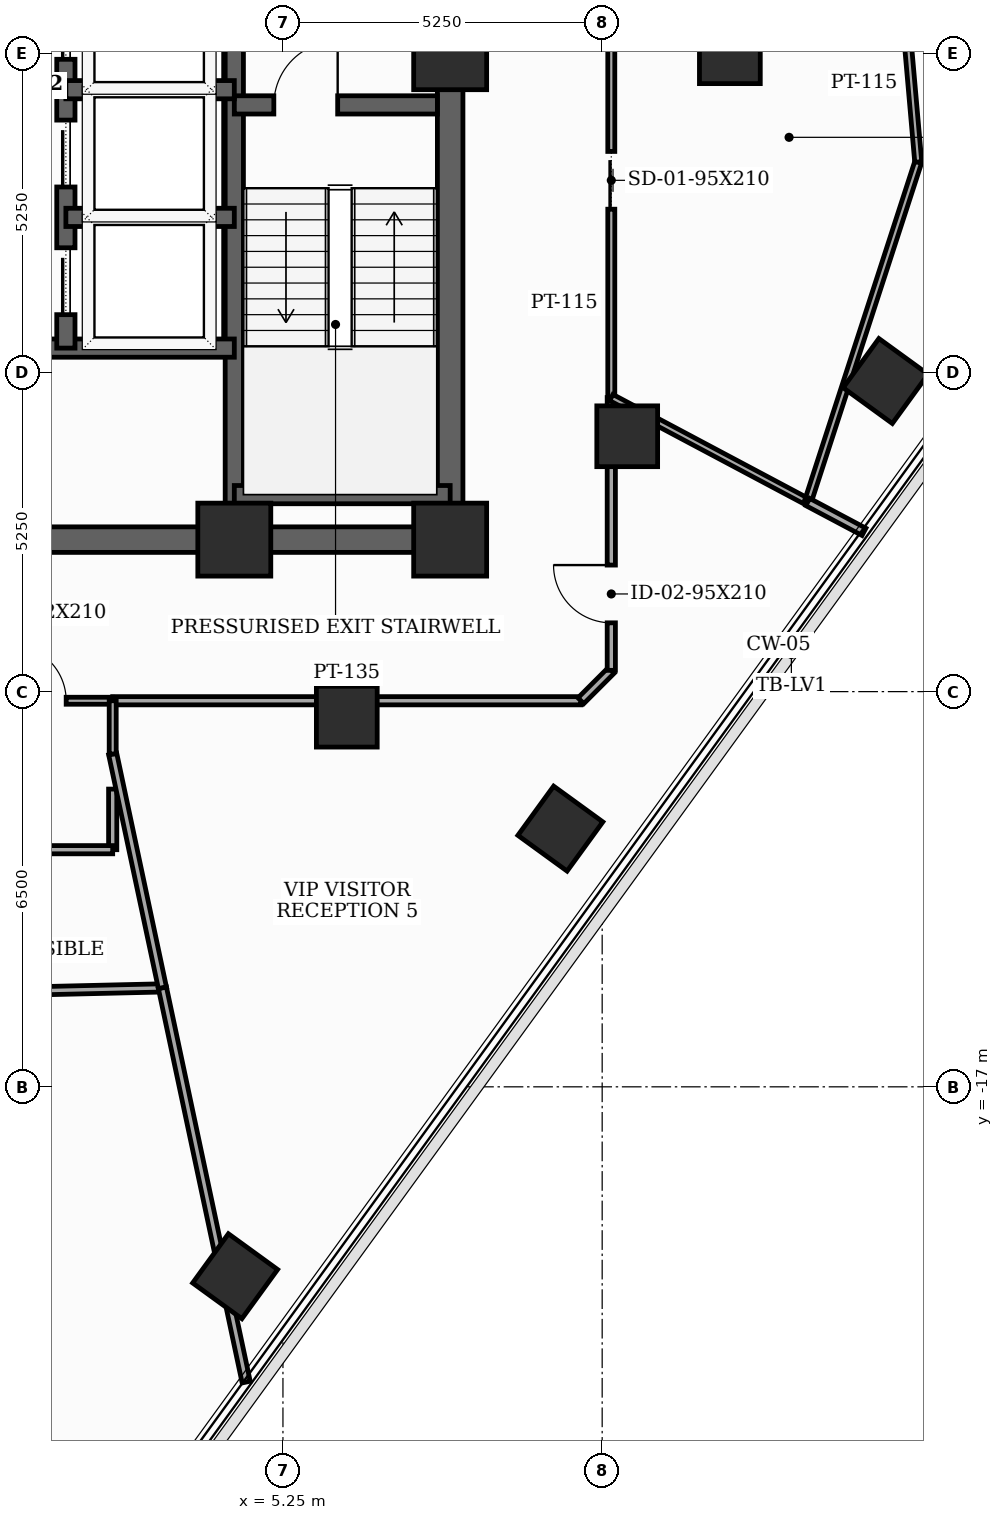
"""IFC4 building model, lengths in metres.
Left out: names, types, materials, properties, quantities, classifications, styles, units other than length and angle.
Written with IfcOpenShell. Run it as: python <this file> out.ifc"""

import sys

from ifc_helpers import new_model, si_unit, direction, frame, frame_2d, origin, origin_2d, place, context, subcontext, project, spatial, rectangle, extrude, element, fill, save


model = new_model("IFC4")
c1 = context("Model", 3, precision=1e-05, world=origin(), true_north=direction((0.0, 1.0)))
c2 = subcontext(c1, "Body", "Model", "MODEL_VIEW")
j1 = project(units=[si_unit("LENGTHUNIT", "METRE"), si_unit("PLANEANGLEUNIT", "RADIAN")], contexts=[c1])
p1 = place(None, origin())
s1 = spatial("IfcSite", under=j1, at=p1, CompositionType="ELEMENT")
p2 = place(p1, origin())
s2 = spatial("IfcBuilding", under=s1, at=p2, CompositionType="ELEMENT")
p3 = place(p2, frame((0.0, 0.0, 218.9)))
s3 = spatial("IfcBuildingStorey", under=s2, at=p3, CompositionType="ELEMENT", Elevation=218.9)
for number, where, z_axis, x_axis in (
    (1, (4.45, -8.0, 0.0), (0.0, 0.0, 1.0), (1.0, 0.0, 0.0)),
    (2, (8.0, -8.0, 0.0), (0.0, 0.0, 1.0), (1.0, 0.0, 0.0)),
    (3, (8.0, 0.0, 0.0), (0.0, 0.0, 1.0), (1.0, 0.0, 0.0)),
):
    element("IfcColumn", number, at=place(p3, frame(where, z_axis=z_axis, x_axis=x_axis)), inside=s3, PredefinedType="COLUMN", context=c2, shape_type="SweptSolid", body=[
        extrude(rectangle(XDim=1.2, YDim=1.2, at=origin_2d()), origin(), (0.0, 0.0, 1.0), 3.7),
    ])
for number, where, z_axis, x_axis in (
    (4, (12.6, 0.0, 0.0), (0.0, 0.0, 1.0), (1.0, 0.0, 0.0)),
    (5, (6.3, -10.912, 0.0), (0.0, 0.0, 1.0), (1.0, 0.0, 0.0)),
    (6, (10.912, -6.3, 0.0), (0.0, 0.0, 1.0), (1.0, 0.0, 0.0)),
    (7, (4.464, -20.115, 0.0), (0.0, 0.0, 1.0), (0.588, 0.809, 0.0)),
    (8, (9.812, -12.753, 0.0), (0.0, 0.0, 1.0), (0.588, 0.809, 0.0)),
    (9, (15.161, -5.391, 0.0), (0.0, 0.0, 1.0), (0.588, 0.809, 0.0)),
):
    element("IfcColumn", number, at=place(p3, frame(where, z_axis=z_axis, x_axis=x_axis)), inside=s3, PredefinedType="COLUMN", context=c2, shape_type="SweptSolid", body=[
        extrude(rectangle(XDim=1.0, YDim=1.0, at=origin_2d()), origin(), (0.0, 0.0, 1.0), 3.7),
    ])
p4 = place(p3, frame((8.0, -8.0, 0.0), z_axis=(0.0, 0.0, 1.0), x_axis=(0.0, 1.0, 0.0)))
e10 = element("IfcWall", 10, at=p4, inside=s3, PredefinedType="SHEAR", context=c2, shape_type="SweptSolid", body=[
    extrude(rectangle(XDim=16.0, YDim=0.42, at=frame_2d((8.0, 0.0))), origin(), (0.0, 0.0, 1.0), 3.5),
])
p5 = place(p4, frame((9.6, 0.0, 0.0)))
e11 = element("IfcOpeningElement", 11, at=p5, cuts=e10, PredefinedType="OPENING", context=c2, shape_type="SweptSolid", body=[
    extrude(rectangle(XDim=1.05, YDim=2.15, at=frame_2d((0.525, 1.075))), frame((0.0, 0.22, 0.0), z_axis=(0.0, -1.0, 0.0), x_axis=(1.0, 0.0, 0.0)), (0.0, 0.0, 1.0), 0.44),
])
p6 = place(p4, frame((14.389, 0.0, 0.0)))
e12 = element("IfcOpeningElement", 12, at=p6, cuts=e10, PredefinedType="OPENING", context=c2, shape_type="SweptSolid", body=[
    extrude(rectangle(XDim=0.85, YDim=2.02, at=frame_2d((0.425, 1.01))), frame((0.0, 0.22, 0.0), z_axis=(0.0, -1.0, 0.0), x_axis=(1.0, 0.0, 0.0)), (0.0, 0.0, 1.0), 0.44),
])
p7 = place(p3, frame((-8.0, -8.0, 0.0), z_axis=(0.0, 0.0, 1.0), x_axis=(1.0, 0.0, 0.0)))
e13 = element("IfcWall", 13, at=p7, inside=s3, PredefinedType="SHEAR", context=c2, shape_type="SweptSolid", body=[
    extrude(rectangle(XDim=16.0, YDim=0.42, at=frame_2d((8.0, 0.0))), origin(), (0.0, 0.0, 1.0), 3.5),
])
p8 = place(p7, frame((7.52, 0.0, 0.0)))
e14 = element("IfcOpeningElement", 14, at=p8, cuts=e13, PredefinedType="OPENING", context=c2, shape_type="SweptSolid", body=[
    extrude(rectangle(XDim=0.95, YDim=2.1, at=frame_2d((0.475, 1.05))), frame((0.0, 0.22, 0.0), z_axis=(0.0, -1.0, 0.0), x_axis=(1.0, 0.0, 0.0)), (0.0, 0.0, 1.0), 0.44),
])
p9 = place(p3, frame((4.45, -7.79, 0.0), z_axis=(0.0, 0.0, 1.0), x_axis=(0.0, 1.0, 0.0)))
e15 = element("IfcWall", 15, at=p9, inside=s3, PredefinedType="SHEAR", context=c2, shape_type="SweptSolid", body=[
    extrude(rectangle(XDim=15.58, YDim=0.3, at=frame_2d((7.79, 0.0))), origin(), (0.0, 0.0, 1.0), 3.5),
])
p10 = place(p3, frame((4.45, -0.85, 0.0), z_axis=(0.0, 0.0, 1.0), x_axis=(1.0, 0.0, 0.0)))
e16 = element("IfcWall", 16, at=p10, inside=s3, PredefinedType="SHEAR", context=c2, shape_type="SweptSolid", body=[
    extrude(rectangle(XDim=3.34, YDim=0.3, at=frame_2d((1.67, 0.0))), origin(), (0.0, 0.0, 1.0), 3.5),
])
p11 = place(p10, frame((0.65, 0.0, 0.0)))
e17 = element("IfcOpeningElement", 17, at=p11, cuts=e16, PredefinedType="OPENING", context=c2, shape_type="SweptSolid", body=[
    extrude(rectangle(XDim=1.05, YDim=2.15, at=frame_2d((0.525, 1.075))), frame((0.0, 0.16, 0.0), z_axis=(0.0, -1.0, 0.0), x_axis=(1.0, 0.0, 0.0)), (0.0, 0.0, 1.0), 0.32),
])
p12 = place(p3, frame((4.45, -7.26, 0.0), z_axis=(0.0, 0.0, 1.0), x_axis=(1.0, 0.0, 0.0)))
e18 = element("IfcWall", 18, at=p12, inside=s3, PredefinedType="SHEAR", context=c2, shape_type="SweptSolid", body=[
    extrude(rectangle(XDim=3.55, YDim=0.3, at=frame_2d((1.775, 0.0))), origin(), (0.0, 0.0, 1.0), 3.5),
])
p13 = place(p3, frame((-4.45, -4.85, 0.0), z_axis=(0.0, 0.0, 1.0), x_axis=(1.0, 0.0, 0.0)))
e19 = element("IfcWall", 19, at=p13, inside=s3, PredefinedType="SHEAR", context=c2, shape_type="SweptSolid", body=[
    extrude(rectangle(XDim=8.9, YDim=0.3, at=frame_2d((4.45, 0.0))), origin(), (0.0, 0.0, 1.0), 3.5),
])
p14 = place(p3, frame((1.68, -4.85, 0.0), z_axis=(0.0, 0.0, 1.0), x_axis=(0.0, 1.0, 0.0)))
e20 = element("IfcWall", 20, at=p14, inside=s3, PredefinedType="SHEAR", context=c2, shape_type="SweptSolid", body=[
    extrude(rectangle(XDim=12.64, YDim=0.3, at=frame_2d((6.32, 0.0))), origin(), (0.0, 0.0, 1.0), 3.5),
])
p15 = place(p14, frame((0.55, 0.0, 0.0)))
e21 = element("IfcOpeningElement", 21, at=p15, cuts=e20, PredefinedType="OPENING", context=c2, shape_type="SweptSolid", body=[
    extrude(rectangle(XDim=1.1, YDim=2.1, at=frame_2d((0.55, 1.05))), frame((0.0, 0.16, 0.0), z_axis=(0.0, -1.0, 0.0), x_axis=(1.0, 0.0, 0.0)), (0.0, 0.0, 1.0), 0.32),
])
p16 = place(p14, frame((2.65, 0.0, 0.0)))
e22 = element("IfcOpeningElement", 22, at=p16, cuts=e20, PredefinedType="OPENING", context=c2, shape_type="SweptSolid", body=[
    extrude(rectangle(XDim=1.1, YDim=2.1, at=frame_2d((0.55, 1.05))), frame((0.0, 0.16, 0.0), z_axis=(0.0, -1.0, 0.0), x_axis=(1.0, 0.0, 0.0)), (0.0, 0.0, 1.0), 0.32),
])
p17 = place(p14, frame((4.75, 0.0, 0.0)))
e23 = element("IfcOpeningElement", 23, at=p17, cuts=e20, PredefinedType="OPENING", context=c2, shape_type="SweptSolid", body=[
    extrude(rectangle(XDim=1.1, YDim=2.1, at=frame_2d((0.55, 1.05))), frame((0.0, 0.16, 0.0), z_axis=(0.0, -1.0, 0.0), x_axis=(1.0, 0.0, 0.0)), (0.0, 0.0, 1.0), 0.32),
])
p18 = place(p14, frame((8.2, 0.0, 0.0)))
e24 = element("IfcOpeningElement", 24, at=p18, cuts=e20, PredefinedType="OPENING", context=c2, shape_type="SweptSolid", body=[
    extrude(rectangle(XDim=0.95, YDim=2.1, at=frame_2d((0.475, 1.05))), frame((0.0, 0.16, 0.0), z_axis=(0.0, -1.0, 0.0), x_axis=(1.0, 0.0, 0.0)), (0.0, 0.0, 1.0), 0.32),
])
p19 = place(p14, frame((11.25, 0.0, 0.0)))
e25 = element("IfcOpeningElement", 25, at=p19, cuts=e20, PredefinedType="OPENING", context=c2, shape_type="SweptSolid", body=[
    extrude(rectangle(XDim=0.95, YDim=2.1, at=frame_2d((0.475, 1.05))), frame((0.0, 0.16, 0.0), z_axis=(0.0, -1.0, 0.0), x_axis=(1.0, 0.0, 0.0)), (0.0, 0.0, 1.0), 0.32),
])
for number, where, z_axis, x_axis in (
    (26, (1.68, -2.7, 0.0), (0.0, 0.0, 1.0), (1.0, 0.0, 0.0)),
    (27, (1.68, -0.6, 0.0), (0.0, 0.0, 1.0), (1.0, 0.0, 0.0)),
):
    element("IfcWall", number, at=place(p3, frame(where, z_axis=z_axis, x_axis=x_axis)), inside=s3, PredefinedType="SHEAR", context=c2, shape_type="SweptSolid", body=[
        extrude(rectangle(XDim=2.77, YDim=0.3, at=frame_2d((1.385, 0.0))), origin(), (0.0, 0.0, 1.0), 3.5),
    ])
p20 = place(p3, frame((10.65, -5.663, 0.0), z_axis=(0.0, 0.0, 1.0), x_axis=(0.0, 1.0, 0.0)))
e28 = element("IfcWall", 28, at=p20, inside=s3, PredefinedType="PARTITIONING", context=c2, shape_type="SweptSolid", body=[
    extrude(rectangle(XDim=7.145, YDim=0.115, at=frame_2d((3.573, 0.0))), origin(), (0.0, 0.0, 1.0), 2.885),
])
p21 = place(p20, frame((3.097, 0.0, 0.0)))
e29 = element("IfcOpeningElement", 29, at=p21, cuts=e28, PredefinedType="OPENING", context=c2, shape_type="SweptSolid", body=[
    extrude(rectangle(XDim=0.95, YDim=2.1, at=frame_2d((0.475, 1.05))), frame((0.0, 0.067, 0.0), z_axis=(0.0, -1.0, 0.0), x_axis=(1.0, 0.0, 0.0)), (0.0, 0.0, 1.0), 0.135),
])
p22 = place(p3, frame((0.0, -10.65, 0.0), z_axis=(0.0, 0.0, 1.0), x_axis=(1.0, 0.0, 0.0)))
e30 = element("IfcWall", 30, at=p22, inside=s3, PredefinedType="PARTITIONING", context=c2, shape_type="SweptSolid", body=[
    extrude(rectangle(XDim=2.45, YDim=0.115, at=frame_2d((1.225, 0.0))), origin(), (0.0, 0.0, 1.0), 3.5),
])
p23 = place(p22, frame((0.765, 0.0, 0.0)))
e31 = element("IfcOpeningElement", 31, at=p23, cuts=e30, PredefinedType="OPENING", context=c2, shape_type="SweptSolid", body=[
    extrude(rectangle(XDim=0.92, YDim=2.1, at=frame_2d((0.46, 1.05))), frame((0.0, 0.067, 0.0), z_axis=(0.0, -1.0, 0.0), x_axis=(1.0, 0.0, 0.0)), (0.0, 0.0, 1.0), 0.135),
])
p24 = place(p3, frame((2.45, -10.65, 0.0), z_axis=(0.0, 0.0, 1.0), x_axis=(1.0, 0.0, 0.0)))
e32 = element("IfcWall", 32, at=p24, inside=s3, PredefinedType="PARTITIONING", context=c2, shape_type="SweptSolid", body=[
    extrude(rectangle(XDim=7.7, YDim=0.135, at=frame_2d((3.85, 0.0))), origin(), (0.0, 0.0, 1.0), 2.885),
])
p25 = place(p3, frame((10.15, -10.65, 0.0), z_axis=(0.0, 0.0, 1.0), x_axis=(0.707106781187, 0.707106781187, 0.0)))
e33 = element("IfcWall", 33, at=p25, inside=s3, PredefinedType="PARTITIONING", context=c2, shape_type="SweptSolid", body=[
    extrude(rectangle(XDim=0.707, YDim=0.135, at=frame_2d((0.354, 0.0))), origin(), (0.0, 0.0, 1.0), 3.5),
])
p26 = place(p3, frame((10.65, -10.15, 0.0), z_axis=(0.0, 0.0, 1.0), x_axis=(0.0, 1.0, 0.0)))
e34 = element("IfcWall", 34, at=p26, inside=s3, PredefinedType="PARTITIONING", context=c2, shape_type="SweptSolid", body=[
    extrude(rectangle(XDim=4.487, YDim=0.135, at=frame_2d((2.243, 0.0))), origin(), (0.0, 0.0, 1.0), 2.885),
])
p27 = place(p26, frame((0.781, 0.0, 0.0)))
e35 = element("IfcOpeningElement", 35, at=p27, cuts=e34, PredefinedType="OPENING", context=c2, shape_type="SweptSolid", body=[
    extrude(rectangle(XDim=0.95, YDim=2.1, at=frame_2d((0.475, 1.05))), frame((0.0, 0.077, 0.0), z_axis=(0.0, -1.0, 0.0), x_axis=(1.0, 0.0, 0.0)), (0.0, 0.0, 1.0), 0.155),
])
p28 = place(p3, frame((10.65, -5.663, 0.0), z_axis=(0.0, 0.0, 1.0), x_axis=(0.882952413676, -0.469462496036, 0.0)))
e36 = element("IfcWall", 36, at=p28, inside=s3, PredefinedType="PARTITIONING", context=c2, shape_type="SweptSolid", body=[
    extrude(rectangle(XDim=3.659, YDim=0.115, at=frame_2d((1.83, 0.0))), origin(), (0.0, 0.0, 1.0), 2.885),
])
p29 = place(p3, frame((13.881, -7.381, 0.0), z_axis=(0.0, 0.0, 1.0), x_axis=(0.309006266506, 0.951060001924, 0.0)))
e37 = element("IfcWall", 37, at=p29, inside=s3, PredefinedType="PARTITIONING", context=c2, shape_type="SweptSolid", body=[
    extrude(rectangle(XDim=5.88, YDim=0.115, at=frame_2d((2.94, 0.0))), origin(), (0.0, 0.0, 1.0), 2.985),
])
p30 = place(p3, frame((15.698, -1.789, 0.0), z_axis=(0.0, 0.0, 1.0), x_axis=(-0.087153009445, 0.996194937221, 0.0)))
e38 = element("IfcWall", 38, at=p30, inside=s3, PredefinedType="PARTITIONING", context=c2, shape_type="SweptSolid", body=[
    extrude(rectangle(XDim=6.3, YDim=0.115, at=frame_2d((3.15, 0.0))), origin(), (0.0, 0.0, 1.0), 2.985),
])
p31 = place(p30, frame((2.69, 0.0, 0.0)))
e39 = element("IfcOpeningElement", 39, at=p31, cuts=e38, PredefinedType="OPENING", context=c2, shape_type="SweptSolid", body=[
    extrude(rectangle(XDim=0.92, YDim=2.1, at=frame_2d((0.46, 1.05))), frame((0.0, 0.067, 0.0), z_axis=(0.0, -1.0, 0.0), x_axis=(1.0, 0.0, 0.0)), (0.0, 0.0, 1.0), 0.135),
])
p32 = place(p3, frame((-2.97, -15.518, 0.0), z_axis=(0.0, 0.0, 1.0), x_axis=(0.99972988351, 0.023241342836, 0.0)))
e40 = element("IfcWall", 40, at=p32, inside=s3, PredefinedType="PARTITIONING", context=c2, shape_type="SweptSolid", body=[
    extrude(rectangle(XDim=6.24, YDim=0.135, at=frame_2d((3.12, 0.0))), origin(), (0.0, 0.0, 1.0), 2.985),
])
p33 = place(p3, frame((2.45, -12.103, 0.0), z_axis=(0.0, 0.0, 1.0), x_axis=(0.0, -1.0, 0.0)))
e41 = element("IfcWall", 41, at=p33, inside=s3, PredefinedType="PARTITIONING", context=c2, shape_type="SweptSolid", body=[
    extrude(rectangle(XDim=0.997, YDim=0.135, at=frame_2d((0.499, 0.0))), origin(), (0.0, 0.0, 1.0), 2.885),
])
p34 = place(p3, frame((2.45, -13.1, 0.0), z_axis=(0.0, 0.0, 1.0), x_axis=(-1.0, 0.0, 0.0)))
e42 = element("IfcWall", 42, at=p34, inside=s3, PredefinedType="PARTITIONING", context=c2, shape_type="SweptSolid", body=[
    extrude(rectangle(XDim=2.45, YDim=0.135, at=frame_2d((1.225, 0.0))), origin(), (0.0, 0.0, 1.0), 2.985),
])
p35 = place(p3, frame((3.268, -15.373, 0.0), z_axis=(0.0, 0.0, 1.0), x_axis=(-0.208002774368, 0.978128235895, 0.0)))
e43 = element("IfcWall", 43, at=p35, inside=s3, PredefinedType="PARTITIONING", context=c2, shape_type="SweptSolid", body=[
    extrude(rectangle(XDim=3.933, YDim=0.135, at=frame_2d((1.967, 0.0))), origin(), (0.0, 0.0, 1.0), 2.885),
])
p36 = place(p3, frame((4.645, -21.856, 0.0), z_axis=(0.0, 0.0, 1.0), x_axis=(-0.207797956892, 0.978171768715, 0.0)))
e44 = element("IfcWall", 44, at=p36, inside=s3, PredefinedType="PARTITIONING", context=c2, shape_type="SweptSolid", body=[
    extrude(rectangle(XDim=6.628, YDim=0.135, at=frame_2d((3.314, 0.0))), origin(), (0.0, 0.0, 1.0), 2.985),
])
p37 = place(p3, frame((2.45, -11.526, 0.0), z_axis=(0.0, 0.0, 1.0), x_axis=(0.0, 1.0, 0.0)))
e45 = element("IfcWall", 45, at=p37, inside=s3, PredefinedType="PARTITIONING", context=c2, shape_type="SweptSolid", body=[
    extrude(rectangle(XDim=0.876, YDim=0.115, at=frame_2d((0.438, 0.0))), origin(), (0.0, 0.0, 1.0), 3.5),
])
p38 = place(p3, frame((14.805, -7.872, 0.0), z_axis=(0.0, 0.0, 1.0), x_axis=(-0.883242549552, 0.468916409033, 0.0)))
e46 = element("IfcWall", 46, at=p38, inside=s3, PredefinedType="PARTITIONING", context=c2, shape_type="SweptSolid", body=[
    extrude(rectangle(XDim=1.046, YDim=0.135, at=frame_2d((0.523, 0.0))), origin(), (0.0, 0.0, 1.0), 3.035),
])
p39 = place(p11, origin())
e47 = element("IfcDoor", 47, at=p39, inside=s3, OperationType="SINGLE_SWING_RIGHT", PredefinedType="DOOR", context=c2, shape_type="SweptSolid", body=[
    extrude(rectangle(XDim=1.05, YDim=2.15, at=frame_2d((0.525, 1.075))), frame((0.0, 0.025, 0.0), z_axis=(0.0, -1.0, 0.0), x_axis=(1.0, 0.0, 0.0)), (0.0, 0.0, 1.0), 0.05),
])
fill(e17, e47)
p40 = place(p15, origin())
e48 = element("IfcDoor", 48, at=p40, inside=s3, OperationType="SLIDING_TO_LEFT", PredefinedType="DOOR", context=c2, shape_type="SweptSolid", body=[
    extrude(rectangle(XDim=1.1, YDim=2.1, at=frame_2d((0.55, 1.05))), frame((0.0, 0.025, 0.0), z_axis=(0.0, -1.0, 0.0), x_axis=(1.0, 0.0, 0.0)), (0.0, 0.0, 1.0), 0.05),
])
fill(e21, e48)
p41 = place(p16, origin())
e49 = element("IfcDoor", 49, at=p41, inside=s3, OperationType="SLIDING_TO_LEFT", PredefinedType="DOOR", context=c2, shape_type="SweptSolid", body=[
    extrude(rectangle(XDim=1.1, YDim=2.1, at=frame_2d((0.55, 1.05))), frame((0.0, 0.025, 0.0), z_axis=(0.0, -1.0, 0.0), x_axis=(1.0, 0.0, 0.0)), (0.0, 0.0, 1.0), 0.05),
])
fill(e22, e49)
p42 = place(p17, origin())
e50 = element("IfcDoor", 50, at=p42, inside=s3, OperationType="SLIDING_TO_LEFT", PredefinedType="DOOR", context=c2, shape_type="SweptSolid", body=[
    extrude(rectangle(XDim=1.1, YDim=2.1, at=frame_2d((0.55, 1.05))), frame((0.0, 0.025, 0.0), z_axis=(0.0, -1.0, 0.0), x_axis=(1.0, 0.0, 0.0)), (0.0, 0.0, 1.0), 0.05),
])
fill(e23, e50)
p43 = place(p21, origin())
e51 = element("IfcDoor", 51, at=p43, inside=s3, OperationType="SLIDING_TO_LEFT", PredefinedType="DOOR", context=c2, shape_type="SweptSolid", body=[
    extrude(rectangle(XDim=0.95, YDim=2.1, at=frame_2d((0.475, 1.05))), frame((0.0, 0.025, 0.0), z_axis=(0.0, -1.0, 0.0), x_axis=(1.0, 0.0, 0.0)), (0.0, 0.0, 1.0), 0.05),
])
fill(e29, e51)
p44 = place(p23, origin())
e52 = element("IfcDoor", 52, at=p44, inside=s3, OperationType="SINGLE_SWING_LEFT", PredefinedType="DOOR", context=c2, shape_type="SweptSolid", body=[
    extrude(rectangle(XDim=0.92, YDim=2.1, at=frame_2d((0.46, 1.05))), frame((0.0, 0.025, 0.0), z_axis=(0.0, -1.0, 0.0), x_axis=(1.0, 0.0, 0.0)), (0.0, 0.0, 1.0), 0.05),
])
fill(e31, e52)
p45 = place(p27, origin())
e53 = element("IfcDoor", 53, at=p45, inside=s3, OperationType="SINGLE_SWING_RIGHT", PredefinedType="DOOR", context=c2, shape_type="SweptSolid", body=[
    extrude(rectangle(XDim=0.95, YDim=2.1, at=frame_2d((0.475, 1.05))), frame((0.0, 0.025, 0.0), z_axis=(0.0, -1.0, 0.0), x_axis=(1.0, 0.0, 0.0)), (0.0, 0.0, 1.0), 0.05),
])
fill(e35, e53)
save(model, sys.argv[1])
